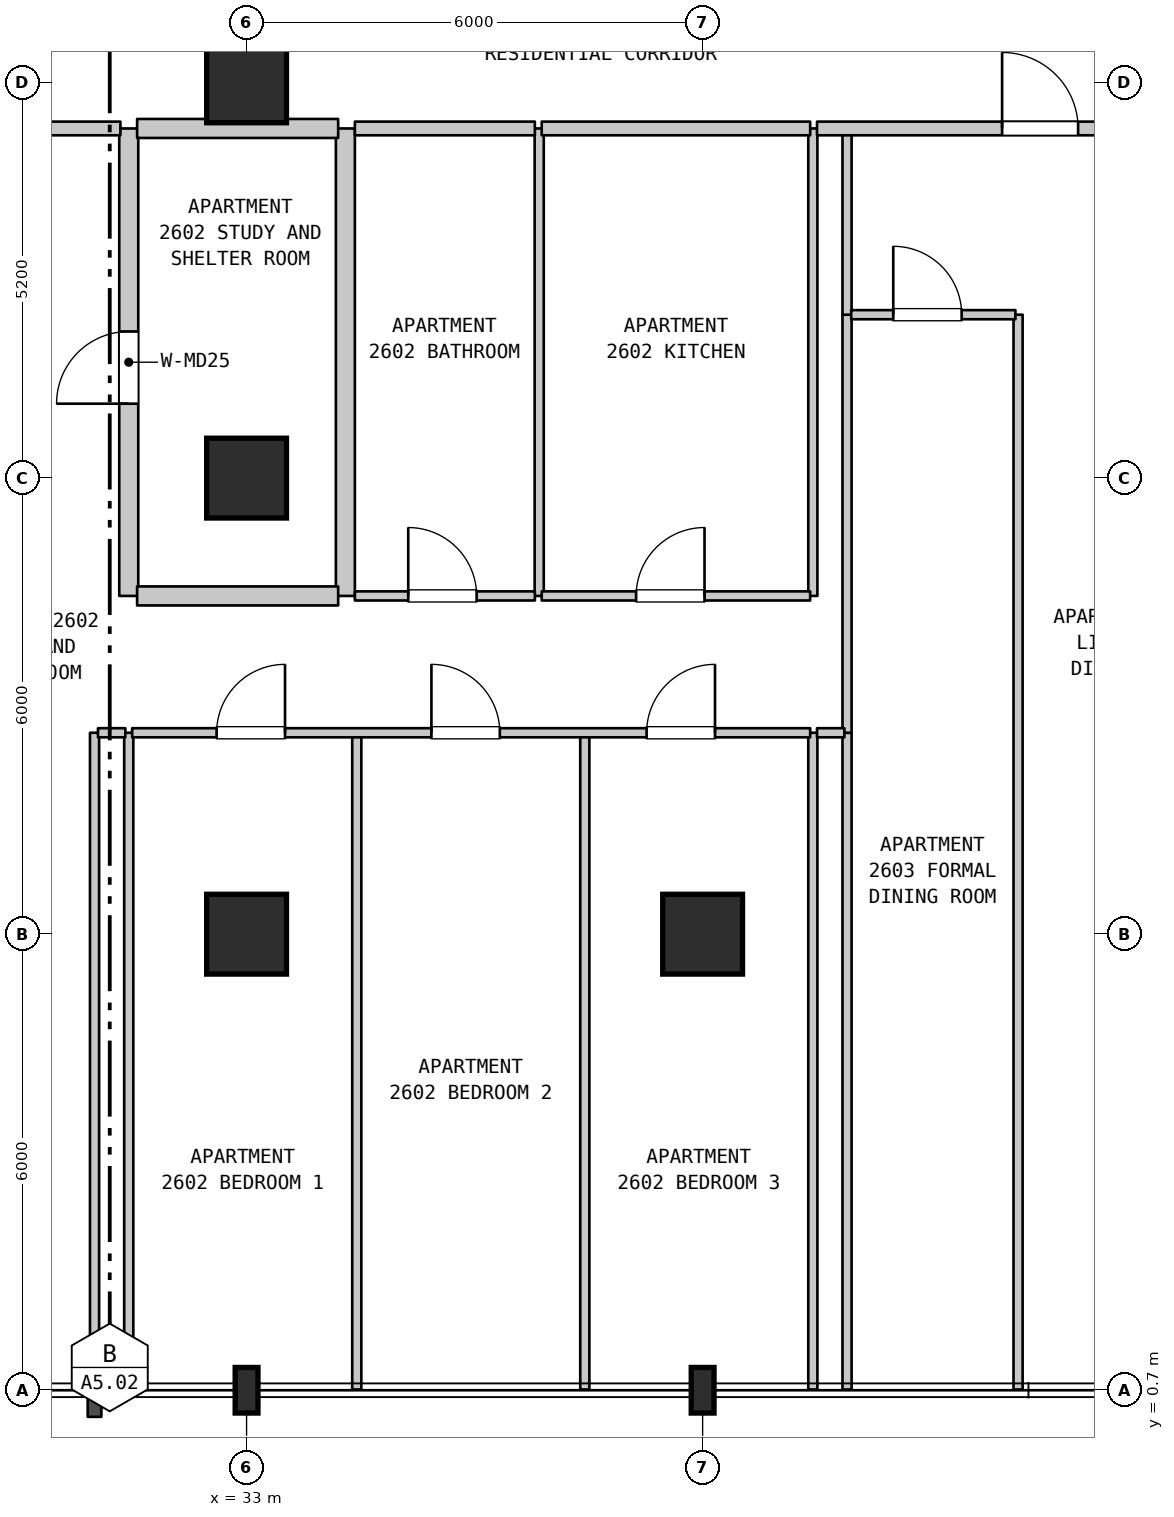
"""IFC4 building model, lengths in metres.
Left out: names, types, materials, properties, quantities, classifications, styles, units other than length and angle.
Written with IfcOpenShell. Run it as: python <this file> out.ifc"""

import sys

from ifc_helpers import new_model, si_unit, direction, frame, frame_2d, origin, origin_2d, place, context, subcontext, project, spatial, rectangle, i_section, extrude, element, fill, save


model = new_model("IFC4")
c1 = context("Model", 3, precision=1e-05, world=origin(), true_north=direction((0.0, 1.0)))
c2 = subcontext(c1, "Body", "Model", "MODEL_VIEW")
j1 = project(units=[si_unit("LENGTHUNIT", "METRE"), si_unit("PLANEANGLEUNIT", "RADIAN")], contexts=[c1])
p1 = place(None, origin())
s1 = spatial("IfcSite", under=j1, at=p1, CompositionType="ELEMENT")
p2 = place(p1, origin())
s2 = spatial("IfcBuilding", under=s1, at=p2, CompositionType="ELEMENT")
p3 = place(p2, frame((0.0, 0.0, 109.4)))
s3 = spatial("IfcBuildingStorey", under=s2, at=p3, CompositionType="ELEMENT", Elevation=109.4)
p4 = place(p3, frame((33.0, 0.7, 0.0), z_axis=(0.0, 0.0, 1.0), x_axis=(1.0, 0.0, 0.0)))
e1 = element("IfcColumn", 1, at=p4, inside=s3, PredefinedType="COLUMN", context=c2, shape_type="SweptSolid", body=[
    extrude(i_section(OverallWidth=0.3, OverallDepth=0.6, WebThickness=0.015, FlangeThickness=0.03, FilletRadius=0.027, at=origin_2d()), origin(), (0.0, 0.0, 1.0), 3.7),
])
for number, where, z_axis, x_axis in (
    (2, (33.0, 6.7, 0.0), (0.0, 0.0, 1.0), (1.0, 0.0, 0.0)),
    (3, (33.0, 12.7, 0.0), (0.0, 0.0, 1.0), (1.0, 0.0, 0.0)),
    (4, (33.0, 17.9, 0.0), (0.0, 0.0, 1.0), (1.0, 0.0, 0.0)),
):
    element("IfcColumn", number, at=place(p3, frame(where, z_axis=z_axis, x_axis=x_axis)), inside=s3, PredefinedType="COLUMN", context=c2, shape_type="SweptSolid", body=[
        extrude(rectangle(XDim=1.05, YDim=1.05, at=origin_2d()), origin(), (0.0, 0.0, 1.0), 3.7),
    ])
p5 = place(p3, frame((39.0, 0.7, 0.0), z_axis=(0.0, 0.0, 1.0), x_axis=(1.0, 0.0, 0.0)))
e5 = element("IfcColumn", 5, at=p5, inside=s3, PredefinedType="COLUMN", context=c2, shape_type="SweptSolid", body=[
    extrude(i_section(OverallWidth=0.3, OverallDepth=0.6, WebThickness=0.015, FlangeThickness=0.03, FilletRadius=0.027, at=origin_2d()), origin(), (0.0, 0.0, 1.0), 3.7),
])
p6 = place(p3, frame((39.0, 6.7, 0.0), z_axis=(0.0, 0.0, 1.0), x_axis=(1.0, 0.0, 0.0)))
e6 = element("IfcColumn", 6, at=p6, inside=s3, PredefinedType="COLUMN", context=c2, shape_type="SweptSolid", body=[
    extrude(rectangle(XDim=1.05, YDim=1.05, at=origin_2d()), origin(), (0.0, 0.0, 1.0), 3.7),
])
for number, where, z_axis, x_axis in (
    (7, (31.0, 0.71, 0.0), (0.0, 0.0, 1.0), (0.0, 1.0, 0.0)),
    (8, (31.45, 0.71, 0.0), (0.0, 0.0, 1.0), (0.0, 1.0, 0.0)),
):
    element("IfcWall", number, at=place(p3, frame(where, z_axis=z_axis, x_axis=x_axis)), inside=s3, PredefinedType="PARTITIONING", context=c2, shape_type="SweptSolid", body=[
        extrude(rectangle(XDim=8.64, YDim=0.12, at=frame_2d((4.32, 0.0))), origin(), (0.0, 0.0, 1.0), 3.385),
    ])
p7 = place(p3, frame((31.45, 11.15, 0.0), z_axis=(0.0, 0.0, 1.0), x_axis=(0.0, 1.0, 0.0)))
e9 = element("IfcWall", 9, at=p7, inside=s3, PredefinedType="STANDARD", context=c2, shape_type="SweptSolid", body=[
    extrude(rectangle(XDim=6.15, YDim=0.25, at=frame_2d((3.075, 0.0))), origin(), (0.0, 0.0, 1.0), 3.385),
])
p8 = place(p7, frame((2.529, 0.0, 0.0)))
e10 = element("IfcOpeningElement", 10, at=p8, cuts=e9, PredefinedType="OPENING", context=c2, shape_type="SweptSolid", body=[
    extrude(rectangle(XDim=0.95, YDim=2.15, at=frame_2d((0.475, 1.075))), frame((0.0, 0.135, 0.0), z_axis=(0.0, -1.0, 0.0), x_axis=(1.0, 0.0, 0.0)), (0.0, 0.0, 1.0), 0.27),
])
p9 = place(p3, frame((34.3, 11.15, 0.0), z_axis=(0.0, 0.0, 1.0), x_axis=(0.0, 1.0, 0.0)))
e11 = element("IfcWall", 11, at=p9, inside=s3, PredefinedType="STANDARD", context=c2, shape_type="SweptSolid", body=[
    extrude(rectangle(XDim=6.15, YDim=0.25, at=frame_2d((3.075, 0.0))), origin(), (0.0, 0.0, 1.0), 3.385),
])
p10 = place(p3, frame((34.45, 0.71, 0.0), z_axis=(0.0, 0.0, 1.0), x_axis=(0.0, 1.0, 0.0)))
e12 = element("IfcWall", 12, at=p10, inside=s3, PredefinedType="PARTITIONING", context=c2, shape_type="SweptSolid", body=[
    extrude(rectangle(XDim=8.64, YDim=0.12, at=frame_2d((4.32, 0.0))), origin(), (0.0, 0.0, 1.0), 3.385),
])
p11 = place(p3, frame((36.85, 11.15, 0.0), z_axis=(0.0, 0.0, 1.0), x_axis=(0.0, 1.0, 0.0)))
e13 = element("IfcWall", 13, at=p11, inside=s3, PredefinedType="PARTITIONING", context=c2, shape_type="SweptSolid", body=[
    extrude(rectangle(XDim=6.15, YDim=0.12, at=frame_2d((3.075, 0.0))), origin(), (0.0, 0.0, 1.0), 3.385),
])
for number, where, z_axis, x_axis in (
    (14, (37.45, 0.71, 0.0), (0.0, 0.0, 1.0), (0.0, 1.0, 0.0)),
    (15, (40.45, 0.71, 0.0), (0.0, 0.0, 1.0), (0.0, 1.0, 0.0)),
):
    element("IfcWall", number, at=place(p3, frame(where, z_axis=z_axis, x_axis=x_axis)), inside=s3, PredefinedType="PARTITIONING", context=c2, shape_type="SweptSolid", body=[
        extrude(rectangle(XDim=8.64, YDim=0.12, at=frame_2d((4.32, 0.0))), origin(), (0.0, 0.0, 1.0), 3.385),
    ])
p12 = place(p3, frame((40.45, 11.15, 0.0), z_axis=(0.0, 0.0, 1.0), x_axis=(0.0, 1.0, 0.0)))
e16 = element("IfcWall", 16, at=p12, inside=s3, PredefinedType="PARTITIONING", context=c2, shape_type="SweptSolid", body=[
    extrude(rectangle(XDim=6.15, YDim=0.12, at=frame_2d((3.075, 0.0))), origin(), (0.0, 0.0, 1.0), 3.385),
])
p13 = place(p3, frame((40.9, 0.71, 0.0), z_axis=(0.0, 0.0, 1.0), x_axis=(0.0, 1.0, 0.0)))
e17 = element("IfcWall", 17, at=p13, inside=s3, PredefinedType="PARTITIONING", context=c2, shape_type="SweptSolid", body=[
    extrude(rectangle(XDim=8.64, YDim=0.12, at=frame_2d((4.32, 0.0))), origin(), (0.0, 0.0, 1.0), 3.385),
])
p14 = place(p3, frame((40.9, 9.35, 0.0), z_axis=(0.0, 0.0, 1.0), x_axis=(0.0, 1.0, 0.0)))
e18 = element("IfcWall", 18, at=p14, inside=s3, PredefinedType="PARTITIONING", context=c2, shape_type="SweptSolid", body=[
    extrude(rectangle(XDim=5.5, YDim=0.12, at=frame_2d((2.75, 0.0))), origin(), (0.0, 0.0, 1.0), 3.385),
])
p15 = place(p3, frame((40.9, 14.85, 0.0), z_axis=(0.0, 0.0, 1.0), x_axis=(0.0, 1.0, 0.0)))
e19 = element("IfcWall", 19, at=p15, inside=s3, PredefinedType="PARTITIONING", context=c2, shape_type="SweptSolid", body=[
    extrude(rectangle(XDim=2.45, YDim=0.12, at=frame_2d((1.225, 0.0))), origin(), (0.0, 0.0, 1.0), 3.385),
])
p16 = place(p3, frame((43.15, 0.71, 0.0), z_axis=(0.0, 0.0, 1.0), x_axis=(0.0, 1.0, 0.0)))
e20 = element("IfcWall", 20, at=p16, inside=s3, PredefinedType="PARTITIONING", context=c2, shape_type="SweptSolid", body=[
    extrude(rectangle(XDim=14.14, YDim=0.12, at=frame_2d((7.07, 0.0))), origin(), (0.0, 0.0, 1.0), 3.385),
])
p17 = place(p3, frame((31.045, 9.35, 0.0), z_axis=(0.0, 0.0, 1.0), x_axis=(1.0, 0.0, 0.0)))
e21 = element("IfcWall", 21, at=p17, inside=s3, PredefinedType="PARTITIONING", context=c2, shape_type="SweptSolid", body=[
    extrude(rectangle(XDim=0.36, YDim=0.12, at=frame_2d((0.18, 0.0))), origin(), (0.0, 0.0, 1.0), 3.385),
])
p18 = place(p3, frame((31.495, 9.35, 0.0), z_axis=(0.0, 0.0, 1.0), x_axis=(1.0, 0.0, 0.0)))
e22 = element("IfcWall", 22, at=p18, inside=s3, PredefinedType="PARTITIONING", context=c2, shape_type="SweptSolid", body=[
    extrude(rectangle(XDim=8.92, YDim=0.12, at=frame_2d((4.46, 0.0))), origin(), (0.0, 0.0, 1.0), 3.385),
])
p19 = place(p18, frame((1.111, 0.0, 0.0)))
e23 = element("IfcOpeningElement", 23, at=p19, cuts=e22, PredefinedType="OPENING", context=c2, shape_type="SweptSolid", body=[
    extrude(rectangle(XDim=0.9, YDim=2.15, at=frame_2d((0.45, 1.075))), frame((0.0, 0.07, 0.0), z_axis=(0.0, -1.0, 0.0), x_axis=(1.0, 0.0, 0.0)), (0.0, 0.0, 1.0), 0.14),
])
p20 = place(p18, frame((3.937, 0.0, 0.0)))
e24 = element("IfcOpeningElement", 24, at=p20, cuts=e22, PredefinedType="OPENING", context=c2, shape_type="SweptSolid", body=[
    extrude(rectangle(XDim=0.9, YDim=2.15, at=frame_2d((0.45, 1.075))), frame((0.0, 0.07, 0.0), z_axis=(0.0, -1.0, 0.0), x_axis=(1.0, 0.0, 0.0)), (0.0, 0.0, 1.0), 0.14),
])
p21 = place(p18, frame((6.768, 0.0, 0.0)))
e25 = element("IfcOpeningElement", 25, at=p21, cuts=e22, PredefinedType="OPENING", context=c2, shape_type="SweptSolid", body=[
    extrude(rectangle(XDim=0.9, YDim=2.15, at=frame_2d((0.45, 1.075))), frame((0.0, 0.07, 0.0), z_axis=(0.0, -1.0, 0.0), x_axis=(1.0, 0.0, 0.0)), (0.0, 0.0, 1.0), 0.14),
])
p22 = place(p3, frame((40.505, 9.35, 0.0), z_axis=(0.0, 0.0, 1.0), x_axis=(1.0, 0.0, 0.0)))
e26 = element("IfcWall", 26, at=p22, inside=s3, PredefinedType="PARTITIONING", context=c2, shape_type="SweptSolid", body=[
    extrude(rectangle(XDim=0.36, YDim=0.12, at=frame_2d((0.18, 0.0))), origin(), (0.0, 0.0, 1.0), 3.385),
])
p23 = place(p3, frame((31.56, 11.15, 0.0), z_axis=(0.0, 0.0, 1.0), x_axis=(1.0, 0.0, 0.0)))
e27 = element("IfcWall", 27, at=p23, inside=s3, PredefinedType="STANDARD", context=c2, shape_type="SweptSolid", body=[
    extrude(rectangle(XDim=2.645, YDim=0.25, at=frame_2d((1.323, 0.0))), origin(), (0.0, 0.0, 1.0), 3.385),
])
p24 = place(p3, frame((34.425, 11.15, 0.0), z_axis=(0.0, 0.0, 1.0), x_axis=(1.0, 0.0, 0.0)))
e28 = element("IfcWall", 28, at=p24, inside=s3, PredefinedType="PARTITIONING", context=c2, shape_type="SweptSolid", body=[
    extrude(rectangle(XDim=2.368, YDim=0.12, at=frame_2d((1.184, 0.0))), origin(), (0.0, 0.0, 1.0), 3.385),
])
p25 = place(p24, frame((0.702, 0.0, 0.0)))
e29 = element("IfcOpeningElement", 29, at=p25, cuts=e28, PredefinedType="OPENING", context=c2, shape_type="SweptSolid", body=[
    extrude(rectangle(XDim=0.9, YDim=2.1, at=frame_2d((0.45, 1.05))), frame((0.0, 0.07, 0.0), z_axis=(0.0, -1.0, 0.0), x_axis=(1.0, 0.0, 0.0)), (0.0, 0.0, 1.0), 0.14),
])
p26 = place(p3, frame((36.883, 11.15, 0.0), z_axis=(0.0, 0.0, 1.0), x_axis=(1.0, 0.0, 0.0)))
e30 = element("IfcWall", 30, at=p26, inside=s3, PredefinedType="PARTITIONING", context=c2, shape_type="SweptSolid", body=[
    extrude(rectangle(XDim=3.532, YDim=0.12, at=frame_2d((1.766, 0.0))), origin(), (0.0, 0.0, 1.0), 3.385),
])
p27 = place(p26, frame((1.242, 0.0, 0.0)))
e31 = element("IfcOpeningElement", 31, at=p27, cuts=e30, PredefinedType="OPENING", context=c2, shape_type="SweptSolid", body=[
    extrude(rectangle(XDim=0.9, YDim=2.15, at=frame_2d((0.45, 1.075))), frame((0.0, 0.07, 0.0), z_axis=(0.0, -1.0, 0.0), x_axis=(1.0, 0.0, 0.0)), (0.0, 0.0, 1.0), 0.14),
])
p28 = place(p3, frame((40.955, 14.85, 0.0), z_axis=(0.0, 0.0, 1.0), x_axis=(1.0, 0.0, 0.0)))
e32 = element("IfcWall", 32, at=p28, inside=s3, PredefinedType="PARTITIONING", context=c2, shape_type="SweptSolid", body=[
    extrude(rectangle(XDim=2.16, YDim=0.12, at=frame_2d((1.08, 0.0))), origin(), (0.0, 0.0, 1.0), 3.385),
])
p29 = place(p28, frame((0.553, 0.0, 0.0)))
e33 = element("IfcOpeningElement", 33, at=p29, cuts=e32, PredefinedType="OPENING", context=c2, shape_type="SweptSolid", body=[
    extrude(rectangle(XDim=0.9, YDim=2.15, at=frame_2d((0.45, 1.075))), frame((0.0, 0.07, 0.0), z_axis=(0.0, -1.0, 0.0), x_axis=(1.0, 0.0, 0.0)), (0.0, 0.0, 1.0), 0.14),
])
p30 = place(p3, frame((26.245, 17.3, 0.0), z_axis=(0.0, 0.0, 1.0), x_axis=(1.0, 0.0, 0.0)))
e34 = element("IfcWall", 34, at=p30, inside=s3, PredefinedType="STANDARD", context=c2, shape_type="SweptSolid", body=[
    extrude(rectangle(XDim=5.095, YDim=0.18, at=frame_2d((2.547, 0.0))), origin(), (0.0, 0.0, 1.0), 3.385),
])
p31 = place(p30, frame((2.08, 0.0, 0.0)))
e35 = element("IfcOpeningElement", 35, at=p31, cuts=e34, PredefinedType="OPENING", context=c2, shape_type="SweptSolid", body=[
    extrude(rectangle(XDim=1.0, YDim=2.15, at=frame_2d((0.5, 1.075))), frame((0.0, 0.1, 0.0), z_axis=(0.0, -1.0, 0.0), x_axis=(1.0, 0.0, 0.0)), (0.0, 0.0, 1.0), 0.2),
])
p32 = place(p3, frame((31.56, 17.3, 0.0), z_axis=(0.0, 0.0, 1.0), x_axis=(1.0, 0.0, 0.0)))
e36 = element("IfcWall", 36, at=p32, inside=s3, PredefinedType="STANDARD", context=c2, shape_type="SweptSolid", body=[
    extrude(rectangle(XDim=2.645, YDim=0.25, at=frame_2d((1.323, 0.0))), origin(), (0.0, 0.0, 1.0), 3.385),
])
p33 = place(p3, frame((34.425, 17.3, 0.0), z_axis=(0.0, 0.0, 1.0), x_axis=(1.0, 0.0, 0.0)))
e37 = element("IfcWall", 37, at=p33, inside=s3, PredefinedType="STANDARD", context=c2, shape_type="SweptSolid", body=[
    extrude(rectangle(XDim=2.368, YDim=0.18, at=frame_2d((1.184, 0.0))), origin(), (0.0, 0.0, 1.0), 3.385),
])
p34 = place(p3, frame((36.883, 17.3, 0.0), z_axis=(0.0, 0.0, 1.0), x_axis=(1.0, 0.0, 0.0)))
e38 = element("IfcWall", 38, at=p34, inside=s3, PredefinedType="STANDARD", context=c2, shape_type="SweptSolid", body=[
    extrude(rectangle(XDim=3.532, YDim=0.18, at=frame_2d((1.766, 0.0))), origin(), (0.0, 0.0, 1.0), 3.385),
])
p35 = place(p3, frame((40.505, 17.3, 0.0), z_axis=(0.0, 0.0, 1.0), x_axis=(1.0, 0.0, 0.0)))
e39 = element("IfcWall", 39, at=p35, inside=s3, PredefinedType="STANDARD", context=c2, shape_type="SweptSolid", body=[
    extrude(rectangle(XDim=5.545, YDim=0.18, at=frame_2d((2.772, 0.0))), origin(), (0.0, 0.0, 1.0), 3.385),
])
p36 = place(p35, frame((2.435, 0.0, 0.0)))
e40 = element("IfcOpeningElement", 40, at=p36, cuts=e39, PredefinedType="OPENING", context=c2, shape_type="SweptSolid", body=[
    extrude(rectangle(XDim=1.0, YDim=2.15, at=frame_2d((0.5, 1.075))), frame((0.0, 0.1, 0.0), z_axis=(0.0, -1.0, 0.0), x_axis=(1.0, 0.0, 0.0)), (0.0, 0.0, 1.0), 0.2),
])
p37 = place(p8, origin())
e41 = element("IfcDoor", 41, at=p37, inside=s3, OperationType="SINGLE_SWING_LEFT", PredefinedType="DOOR", context=c2, shape_type="SweptSolid", body=[
    extrude(rectangle(XDim=0.95, YDim=2.15, at=frame_2d((0.475, 1.075))), frame((0.0, 0.025, 0.0), z_axis=(0.0, -1.0, 0.0), x_axis=(1.0, 0.0, 0.0)), (0.0, 0.0, 1.0), 0.05),
])
fill(e10, e41)
p38 = place(p19, origin())
e42 = element("IfcDoor", 42, at=p38, inside=s3, OperationType="SINGLE_SWING_RIGHT", PredefinedType="DOOR", context=c2, shape_type="SweptSolid", body=[
    extrude(rectangle(XDim=0.9, YDim=2.15, at=frame_2d((0.45, 1.075))), frame((0.0, 0.025, 0.0), z_axis=(0.0, -1.0, 0.0), x_axis=(1.0, 0.0, 0.0)), (0.0, 0.0, 1.0), 0.05),
])
fill(e23, e42)
p39 = place(p20, origin())
e43 = element("IfcDoor", 43, at=p39, inside=s3, OperationType="SINGLE_SWING_LEFT", PredefinedType="DOOR", context=c2, shape_type="SweptSolid", body=[
    extrude(rectangle(XDim=0.9, YDim=2.15, at=frame_2d((0.45, 1.075))), frame((0.0, 0.025, 0.0), z_axis=(0.0, -1.0, 0.0), x_axis=(1.0, 0.0, 0.0)), (0.0, 0.0, 1.0), 0.05),
])
fill(e24, e43)
p40 = place(p21, origin())
e44 = element("IfcDoor", 44, at=p40, inside=s3, OperationType="SINGLE_SWING_RIGHT", PredefinedType="DOOR", context=c2, shape_type="SweptSolid", body=[
    extrude(rectangle(XDim=0.9, YDim=2.15, at=frame_2d((0.45, 1.075))), frame((0.0, 0.025, 0.0), z_axis=(0.0, -1.0, 0.0), x_axis=(1.0, 0.0, 0.0)), (0.0, 0.0, 1.0), 0.05),
])
fill(e25, e44)
p41 = place(p25, origin())
e45 = element("IfcDoor", 45, at=p41, inside=s3, OperationType="SINGLE_SWING_LEFT", PredefinedType="DOOR", context=c2, shape_type="SweptSolid", body=[
    extrude(rectangle(XDim=0.9, YDim=2.1, at=frame_2d((0.45, 1.05))), frame((0.0, 0.025, 0.0), z_axis=(0.0, -1.0, 0.0), x_axis=(1.0, 0.0, 0.0)), (0.0, 0.0, 1.0), 0.05),
])
fill(e29, e45)
p42 = place(p27, origin())
e46 = element("IfcDoor", 46, at=p42, inside=s3, OperationType="SINGLE_SWING_RIGHT", PredefinedType="DOOR", context=c2, shape_type="SweptSolid", body=[
    extrude(rectangle(XDim=0.9, YDim=2.15, at=frame_2d((0.45, 1.075))), frame((0.0, 0.025, 0.0), z_axis=(0.0, -1.0, 0.0), x_axis=(1.0, 0.0, 0.0)), (0.0, 0.0, 1.0), 0.05),
])
fill(e31, e46)
p43 = place(p29, origin())
e47 = element("IfcDoor", 47, at=p43, inside=s3, OperationType="SINGLE_SWING_LEFT", PredefinedType="DOOR", context=c2, shape_type="SweptSolid", body=[
    extrude(rectangle(XDim=0.9, YDim=2.15, at=frame_2d((0.45, 1.075))), frame((0.0, 0.025, 0.0), z_axis=(0.0, -1.0, 0.0), x_axis=(1.0, 0.0, 0.0)), (0.0, 0.0, 1.0), 0.05),
])
fill(e33, e47)
p44 = place(p36, origin())
e48 = element("IfcDoor", 48, at=p44, inside=s3, OperationType="SINGLE_SWING_LEFT", PredefinedType="DOOR", context=c2, shape_type="SweptSolid", body=[
    extrude(rectangle(XDim=1.0, YDim=2.15, at=frame_2d((0.5, 1.075))), frame((0.0, 0.025, 0.0), z_axis=(0.0, -1.0, 0.0), x_axis=(1.0, 0.0, 0.0)), (0.0, 0.0, 1.0), 0.05),
])
fill(e40, e48)
save(model, sys.argv[1])
